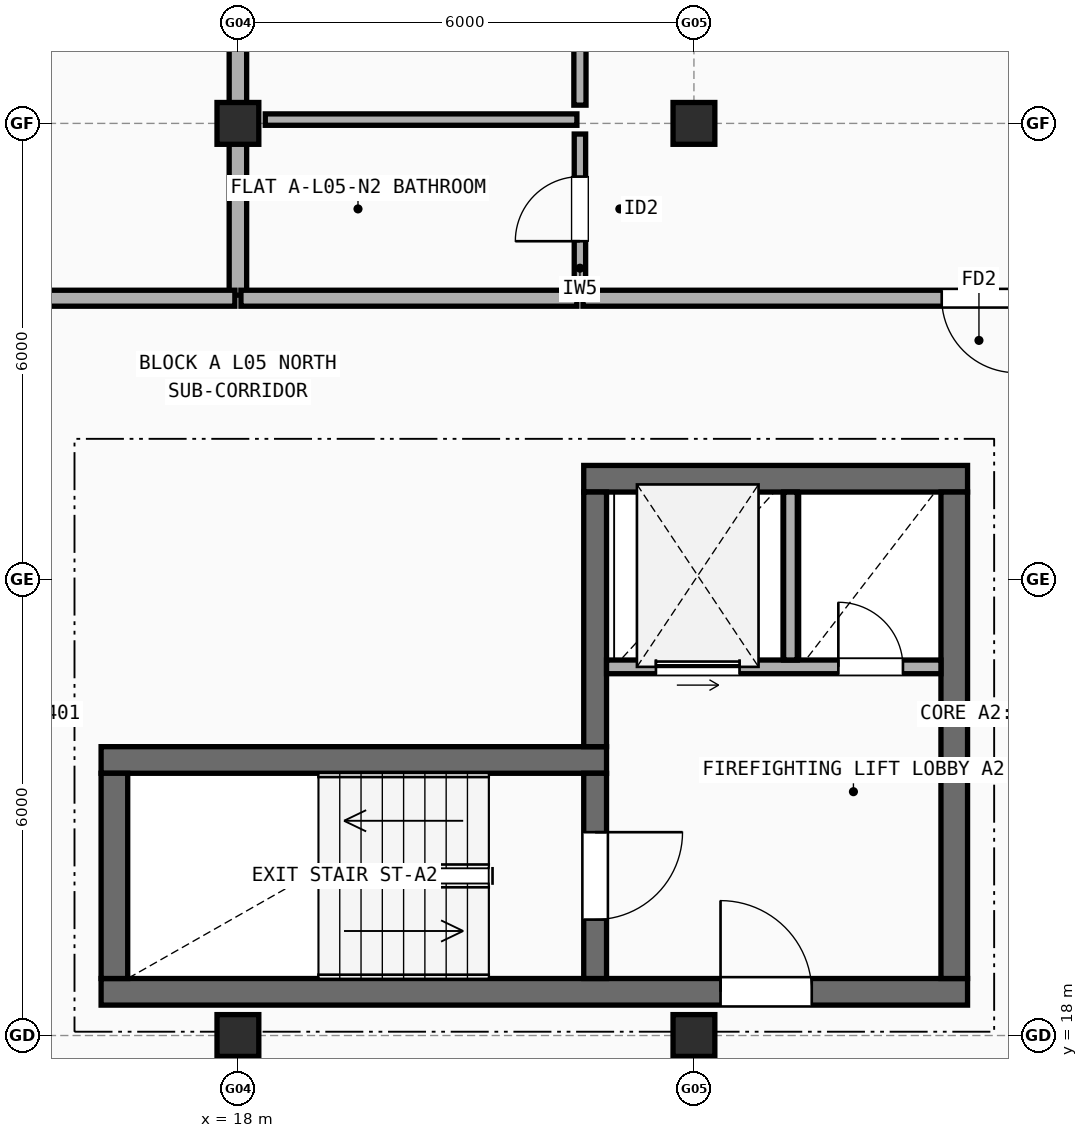
"""IFC4 building model, lengths in metres.
Left out: names, types, materials, properties, quantities, classifications, styles, units other than length and angle.
Written with IfcOpenShell. Run it as: python <this file> out.ifc"""

import sys

from ifc_helpers import new_model, si_unit, direction, frame, frame_2d, origin, origin_2d, place, context, subcontext, project, spatial, rectangle, extrude, element, fill, save


model = new_model("IFC4")
c1 = context("Model", 3, precision=1e-05, world=origin(), true_north=direction((0.0, 1.0)))
c2 = subcontext(c1, "Body", "Model", "MODEL_VIEW")
j1 = project(units=[si_unit("LENGTHUNIT", "METRE"), si_unit("PLANEANGLEUNIT", "RADIAN")], contexts=[c1])
p1 = place(None, origin())
s1 = spatial("IfcSite", under=j1, at=p1, CompositionType="ELEMENT")
p2 = place(p1, origin())
s2 = spatial("IfcBuilding", under=s1, at=p2, CompositionType="ELEMENT")
p3 = place(p2, frame((0.0, 0.0, 17.3)))
s3 = spatial("IfcBuildingStorey", under=s2, at=p3, CompositionType="ELEMENT", Elevation=17.3)
for number, where, z_axis, x_axis in (
    (1, (18.0, 18.0, 0.0), (0.0, 0.0, 1.0), (1.0, 0.0, 0.0)),
    (2, (18.0, 30.0, 0.0), (0.0, 0.0, 1.0), (1.0, 0.0, 0.0)),
    (3, (24.0, 18.0, 0.0), (0.0, 0.0, 1.0), (1.0, 0.0, 0.0)),
    (4, (24.0, 30.0, 0.0), (0.0, 0.0, 1.0), (1.0, 0.0, 0.0)),
):
    element("IfcColumn", number, at=place(p3, frame(where, z_axis=z_axis, x_axis=x_axis)), inside=s3, PredefinedType="COLUMN", context=c2, shape_type="SweptSolid", body=[
        extrude(rectangle(XDim=0.55, YDim=0.55, at=origin_2d()), origin(), (0.0, 0.0, 1.0), 2.965),
    ])
p4 = place(p3, frame((16.2, 18.575, 0.0), z_axis=(0.0, 0.0, 1.0), x_axis=(1.0, 0.0, 0.0)))
e5 = element("IfcWall", 5, at=p4, inside=s3, PredefinedType="SHEAR", context=c2, shape_type="SweptSolid", body=[
    extrude(rectangle(XDim=11.4, YDim=0.35, at=frame_2d((5.7, 0.0))), origin(), (0.0, 0.0, 1.0), 2.965),
])
p5 = place(p4, frame((8.15, 0.0, 0.0)))
e6 = element("IfcOpeningElement", 6, at=p5, cuts=e5, PredefinedType="OPENING", context=c2, shape_type="SweptSolid", body=[
    extrude(rectangle(XDim=1.2, YDim=2.15, at=frame_2d((0.6, 1.075))), frame((0.0, 0.185, 0.0), z_axis=(0.0, -1.0, 0.0), x_axis=(1.0, 0.0, 0.0)), (0.0, 0.0, 1.0), 0.37),
])
p6 = place(p3, frame((22.85, 21.625, 0.0), z_axis=(0.0, 0.0, 1.0), x_axis=(-1.0, 0.0, 0.0)))
e7 = element("IfcWall", 7, at=p6, inside=s3, PredefinedType="SHEAR", context=c2, shape_type="SweptSolid", body=[
    extrude(rectangle(XDim=6.65, YDim=0.35, at=frame_2d((3.325, 0.0))), origin(), (0.0, 0.0, 1.0), 2.965),
])
p7 = place(p3, frame((16.375, 21.45, 0.0), z_axis=(0.0, 0.0, 1.0), x_axis=(0.0, -1.0, 0.0)))
e8 = element("IfcWall", 8, at=p7, inside=s3, PredefinedType="SHEAR", context=c2, shape_type="SweptSolid", body=[
    extrude(rectangle(XDim=2.7, YDim=0.35, at=frame_2d((1.35, 0.0))), origin(), (0.0, 0.0, 1.0), 2.965),
])
p8 = place(p3, frame((22.7, 18.75, 0.0), z_axis=(0.0, 0.0, 1.0), x_axis=(0.0, 1.0, 0.0)))
e9 = element("IfcWall", 9, at=p8, inside=s3, PredefinedType="SHEAR", context=c2, shape_type="SweptSolid", body=[
    extrude(rectangle(XDim=2.7, YDim=0.3, at=frame_2d((1.35, 0.0))), origin(), (0.0, 0.0, 1.0), 2.965),
])
p9 = place(p8, frame((0.775, 0.0, 0.0)))
e10 = element("IfcOpeningElement", 10, at=p9, cuts=e9, PredefinedType="OPENING", context=c2, shape_type="SweptSolid", body=[
    extrude(rectangle(XDim=1.15, YDim=2.15, at=frame_2d((0.575, 1.075))), frame((0.0, 0.16, 0.0), z_axis=(0.0, -1.0, 0.0), x_axis=(1.0, 0.0, 0.0)), (0.0, 0.0, 1.0), 0.32),
])
p10 = place(p3, frame((27.6, 25.325, 0.0), z_axis=(0.0, 0.0, 1.0), x_axis=(-1.0, 0.0, 0.0)))
e11 = element("IfcWall", 11, at=p10, inside=s3, PredefinedType="SHEAR", context=c2, shape_type="SweptSolid", body=[
    extrude(rectangle(XDim=5.05, YDim=0.35, at=frame_2d((2.525, 0.0))), origin(), (0.0, 0.0, 1.0), 2.965),
])
p11 = place(p3, frame((27.425, 18.75, 0.0), z_axis=(0.0, 0.0, 1.0), x_axis=(0.0, 1.0, 0.0)))
e12 = element("IfcWall", 12, at=p11, inside=s3, PredefinedType="SHEAR", context=c2, shape_type="SweptSolid", body=[
    extrude(rectangle(XDim=6.4, YDim=0.35, at=frame_2d((3.2, 0.0))), origin(), (0.0, 0.0, 1.0), 2.965),
])
p12 = place(p3, frame((22.7, 21.8, 0.0), z_axis=(0.0, 0.0, 1.0), x_axis=(0.0, 1.0, 0.0)))
e13 = element("IfcWall", 13, at=p12, inside=s3, PredefinedType="SHEAR", context=c2, shape_type="SweptSolid", body=[
    extrude(rectangle(XDim=3.35, YDim=0.3, at=frame_2d((1.675, 0.0))), origin(), (0.0, 0.0, 1.0), 2.965),
])
p13 = place(p3, frame((22.85, 22.85, 0.0), z_axis=(0.0, 0.0, 1.0), x_axis=(1.0, 0.0, 0.0)))
e14 = element("IfcWall", 14, at=p13, inside=s3, PredefinedType="SOLIDWALL", context=c2, shape_type="SweptSolid", body=[
    extrude(rectangle(XDim=4.4, YDim=0.18, at=frame_2d((2.2, 0.0))), origin(), (0.0, 0.0, 1.0), 2.965),
])
p14 = place(p13, frame((0.65, 0.0, 0.0)))
e15 = element("IfcOpeningElement", 15, at=p14, cuts=e14, PredefinedType="OPENING", context=c2, shape_type="SweptSolid", body=[
    extrude(rectangle(XDim=1.1, YDim=2.15, at=frame_2d((0.55, 1.075))), frame((0.0, 0.1, 0.0), z_axis=(0.0, -1.0, 0.0), x_axis=(1.0, 0.0, 0.0)), (0.0, 0.0, 1.0), 0.2),
])
p15 = place(p13, frame((3.05, 0.0, 0.0)))
e16 = element("IfcOpeningElement", 16, at=p15, cuts=e14, PredefinedType="OPENING", context=c2, shape_type="SweptSolid", body=[
    extrude(rectangle(XDim=0.85, YDim=2.1, at=frame_2d((0.425, 1.05))), frame((0.0, 0.1, 0.0), z_axis=(0.0, -1.0, 0.0), x_axis=(1.0, 0.0, 0.0)), (0.0, 0.0, 1.0), 0.2),
])
p16 = place(p3, frame((25.27, 22.94, 0.0), z_axis=(0.0, 0.0, 1.0), x_axis=(0.0, 1.0, 0.0)))
e17 = element("IfcWall", 17, at=p16, inside=s3, PredefinedType="SOLIDWALL", context=c2, shape_type="SweptSolid", body=[
    extrude(rectangle(XDim=2.21, YDim=0.18, at=frame_2d((1.105, 0.0))), origin(), (0.0, 0.0, 1.0), 2.965),
])
p17 = place(p3, frame((18.0, 27.74, 0.0), z_axis=(0.0, 0.0, 1.0), x_axis=(0.0, 1.0, 0.0)))
e18 = element("IfcWall", 18, at=p17, inside=s3, PredefinedType="SOLIDWALL", context=c2, shape_type="SweptSolid", body=[
    extrude(rectangle(XDim=13.87, YDim=0.23, at=frame_2d((6.935, 0.0))), origin(), (0.0, 0.0, 1.0), 2.458),
])
p18 = place(p3, frame((15.04, 27.7, 0.0), z_axis=(0.0, 0.0, 1.0), x_axis=(1.0, 0.0, 0.0)))
e19 = element("IfcWall", 19, at=p18, inside=s3, PredefinedType="SOLIDWALL", context=c2, shape_type="SweptSolid", body=[
    extrude(rectangle(XDim=2.92, YDim=0.21, at=frame_2d((1.46, 0.0))), origin(), (0.0, 0.0, 1.0), 2.965),
])
p19 = place(p3, frame((18.04, 27.7, 0.0), z_axis=(0.0, 0.0, 1.0), x_axis=(1.0, 0.0, 0.0)))
e20 = element("IfcWall", 20, at=p19, inside=s3, PredefinedType="SOLIDWALL", context=c2, shape_type="SweptSolid", body=[
    extrude(rectangle(XDim=4.42, YDim=0.21, at=frame_2d((2.21, 0.0))), origin(), (0.0, 0.0, 1.0), 2.965),
])
p20 = place(p3, frame((22.54, 27.7, 0.0), z_axis=(0.0, 0.0, 1.0), x_axis=(1.0, 0.0, 0.0)))
e21 = element("IfcWall", 21, at=p20, inside=s3, PredefinedType="SOLIDWALL", context=c2, shape_type="SweptSolid", body=[
    extrude(rectangle(XDim=10.42, YDim=0.21, at=frame_2d((5.21, 0.0))), origin(), (0.0, 0.0, 1.0), 2.447),
])
p21 = place(p20, frame((4.72, 0.0, 0.0)))
e22 = element("IfcOpeningElement", 22, at=p21, cuts=e21, PredefinedType="OPENING", context=c2, shape_type="SweptSolid", body=[
    extrude(rectangle(XDim=0.98, YDim=2.15, at=frame_2d((0.49, 1.075))), frame((0.0, 0.115, 0.0), z_axis=(0.0, -1.0, 0.0), x_axis=(1.0, 0.0, 0.0)), (0.0, 0.0, 1.0), 0.23),
])
p22 = place(p3, frame((22.5, 30.24, 0.0), z_axis=(0.0, 0.0, 1.0), x_axis=(0.0, 1.0, 0.0)))
e23 = element("IfcWall", 23, at=p22, inside=s3, PredefinedType="PLUMBINGWALL", context=c2, shape_type="SweptSolid", body=[
    extrude(rectangle(XDim=7.37, YDim=0.16, at=frame_2d((3.685, 0.0))), origin(), (0.0, 0.0, 1.0), 2.447),
])
p23 = place(p22, frame((3.235, 0.0, 0.0)))
e24 = element("IfcOpeningElement", 24, at=p23, cuts=e23, PredefinedType="OPENING", context=c2, shape_type="SweptSolid", body=[
    extrude(rectangle(XDim=0.9, YDim=2.1, at=frame_2d((0.45, 1.05))), frame((0.0, 0.09, 0.0), z_axis=(0.0, -1.0, 0.0), x_axis=(1.0, 0.0, 0.0)), (0.0, 0.0, 1.0), 0.18),
])
p24 = place(p3, frame((22.5, 27.89, 0.0), z_axis=(0.0, 0.0, 1.0), x_axis=(0.0, 1.0, 0.0)))
e25 = element("IfcWall", 25, at=p24, inside=s3, PredefinedType="PARTITIONING", context=c2, shape_type="SweptSolid", body=[
    extrude(rectangle(XDim=1.97, YDim=0.15, at=frame_2d((0.985, 0.0))), origin(), (0.0, 0.0, 1.0), 2.965),
])
p25 = place(p24, frame((0.56, 0.0, 0.0)))
e26 = element("IfcOpeningElement", 26, at=p25, cuts=e25, PredefinedType="OPENING", context=c2, shape_type="SweptSolid", body=[
    extrude(rectangle(XDim=0.85, YDim=2.1, at=frame_2d((0.425, 1.05))), frame((0.0, 0.085, 0.0), z_axis=(0.0, -1.0, 0.0), x_axis=(1.0, 0.0, 0.0)), (0.0, 0.0, 1.0), 0.17),
])
p26 = place(p3, frame((18.36, 30.05, 0.0), z_axis=(0.0, 0.0, 1.0), x_axis=(1.0, 0.0, 0.0)))
e27 = element("IfcWall", 27, at=p26, inside=s3, PredefinedType="PARTITIONING", context=c2, shape_type="SweptSolid", body=[
    extrude(rectangle(XDim=4.1, YDim=0.15, at=frame_2d((2.05, 0.0))), origin(), (0.0, 0.0, 1.0), 2.447),
])
p27 = place(p5, origin())
e28 = element("IfcDoor", 28, at=p27, inside=s3, OperationType="SINGLE_SWING_LEFT", PredefinedType="DOOR", context=c2, shape_type="SweptSolid", body=[
    extrude(rectangle(XDim=1.2, YDim=2.15, at=frame_2d((0.6, 1.075))), frame((0.0, 0.025, 0.0), z_axis=(0.0, -1.0, 0.0), x_axis=(1.0, 0.0, 0.0)), (0.0, 0.0, 1.0), 0.05),
])
fill(e6, e28)
p28 = place(p9, origin())
e29 = element("IfcDoor", 29, at=p28, inside=s3, OperationType="SINGLE_SWING_RIGHT", PredefinedType="DOOR", context=c2, shape_type="SweptSolid", body=[
    extrude(rectangle(XDim=1.15, YDim=2.15, at=frame_2d((0.575, 1.075))), frame((0.0, 0.025, 0.0), z_axis=(0.0, -1.0, 0.0), x_axis=(1.0, 0.0, 0.0)), (0.0, 0.0, 1.0), 0.05),
])
fill(e10, e29)
p29 = place(p14, origin())
e30 = element("IfcDoor", 30, at=p29, inside=s3, OperationType="SLIDING_TO_LEFT", PredefinedType="DOOR", context=c2, shape_type="SweptSolid", body=[
    extrude(rectangle(XDim=1.1, YDim=2.15, at=frame_2d((0.55, 1.075))), frame((0.0, 0.025, 0.0), z_axis=(0.0, -1.0, 0.0), x_axis=(1.0, 0.0, 0.0)), (0.0, 0.0, 1.0), 0.05),
])
fill(e15, e30)
p30 = place(p15, frame((0.85, 0.0, 0.0), z_axis=(0.0, 0.0, 1.0), x_axis=(-1.0, 0.0, 0.0)))
e31 = element("IfcDoor", 31, at=p30, inside=s3, OperationType="SINGLE_SWING_LEFT", PredefinedType="DOOR", context=c2, shape_type="SweptSolid", body=[
    extrude(rectangle(XDim=0.85, YDim=2.1, at=frame_2d((0.425, 1.05))), frame((0.0, 0.025, 0.0), z_axis=(0.0, -1.0, 0.0), x_axis=(1.0, 0.0, 0.0)), (0.0, 0.0, 1.0), 0.05),
])
fill(e16, e31)
p31 = place(p21, origin())
e32 = element("IfcDoor", 32, at=p31, inside=s3, OperationType="SINGLE_SWING_RIGHT", PredefinedType="DOOR", context=c2, shape_type="SweptSolid", body=[
    extrude(rectangle(XDim=0.98, YDim=2.15, at=frame_2d((0.49, 1.075))), frame((0.0, 0.025, 0.0), z_axis=(0.0, -1.0, 0.0), x_axis=(1.0, 0.0, 0.0)), (0.0, 0.0, 1.0), 0.05),
])
fill(e22, e32)
p32 = place(p25, origin())
e33 = element("IfcDoor", 33, at=p32, inside=s3, OperationType="SINGLE_SWING_LEFT", PredefinedType="DOOR", context=c2, shape_type="SweptSolid", body=[
    extrude(rectangle(XDim=0.85, YDim=2.1, at=frame_2d((0.425, 1.05))), frame((0.0, 0.025, 0.0), z_axis=(0.0, -1.0, 0.0), x_axis=(1.0, 0.0, 0.0)), (0.0, 0.0, 1.0), 0.05),
])
fill(e26, e33)
save(model, sys.argv[1])
